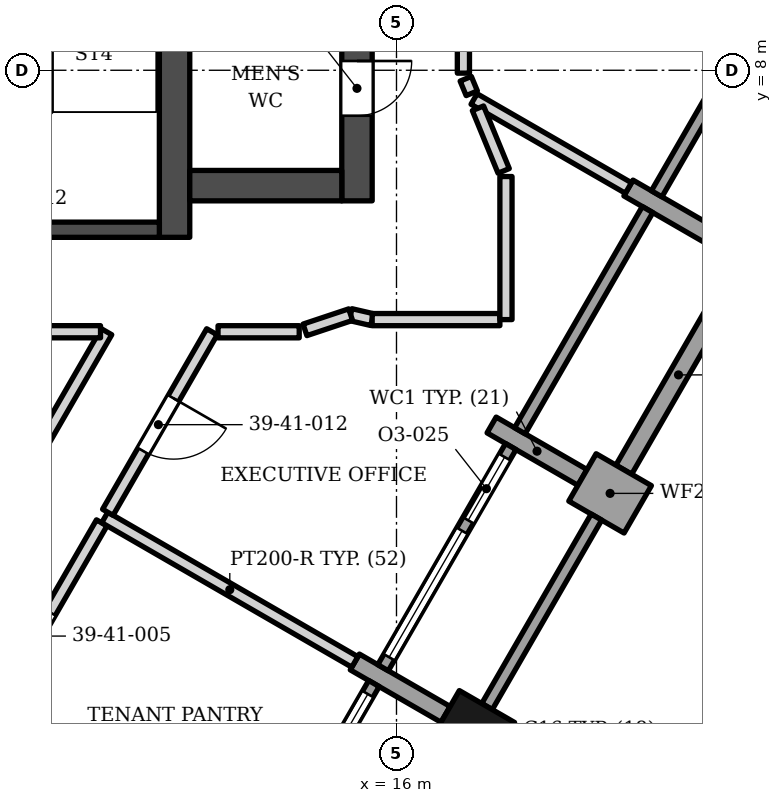
"""IFC4 building model, lengths in metres.
Left out: names, types, materials, properties, quantities, classifications, styles, units other than length and angle.
Written with IfcOpenShell. Run it as: python <this file> out.ifc"""

import sys

from ifc_helpers import new_model, si_unit, direction, frame, frame_2d, origin, origin_2d, place, context, subcontext, project, spatial, polyline, rectangle, outline, extrude, element, fill, save


model = new_model("IFC4")
c1 = context("Model", 3, precision=1e-05, world=origin(), true_north=direction((0.0, 1.0)))
c2 = subcontext(c1, "Body", "Model", "MODEL_VIEW")
j1 = project(units=[si_unit("LENGTHUNIT", "METRE"), si_unit("PLANEANGLEUNIT", "RADIAN")], contexts=[c1])
p1 = place(None, origin())
s1 = spatial("IfcSite", under=j1, at=p1, CompositionType="ELEMENT")
p2 = place(p1, origin())
s2 = spatial("IfcBuilding", under=s1, at=p2, CompositionType="ELEMENT")
p3 = place(p2, frame((0.0, 0.0, 168.0)))
s3 = spatial("IfcBuildingStorey", under=s2, at=p3, CompositionType="ELEMENT", Elevation=168.0)
p4 = place(p3, frame((12.35, 5.253, 0.0), z_axis=(0.0, 0.0, 1.0), x_axis=(0.0, 1.0, 0.0)))
e1 = element("IfcWall", 1, at=p4, inside=s3, PredefinedType="SHEAR", context=c2, shape_type="SweptSolid", body=[
    extrude(rectangle(XDim=13.3, YDim=0.5, at=frame_2d((6.65, 0.0))), origin(), (0.0, 0.0, 1.0), 3.9),
])
p5 = place(p3, frame((8.35, 5.378, 0.0), z_axis=(0.0, 0.0, 1.0), x_axis=(1.0, 0.0, 0.0)))
e2 = element("IfcWall", 2, at=p5, inside=s3, PredefinedType="SHEAR", context=c2, shape_type="SweptSolid", body=[
    extrude(rectangle(XDim=3.75, YDim=0.25, at=frame_2d((1.875, 0.0))), origin(), (0.0, 0.0, 1.0), 3.9),
])
p6 = place(p3, frame((12.6, 6.103, 0.0), z_axis=(0.0, 0.0, 1.0), x_axis=(1.0, 0.0, 0.0)))
e3 = element("IfcWall", 3, at=p6, inside=s3, PredefinedType="SHEAR", context=c2, shape_type="SweptSolid", body=[
    extrude(rectangle(XDim=2.5, YDim=0.5, at=frame_2d((1.25, 0.0))), origin(), (0.0, 0.0, 1.0), 3.9),
])
p7 = place(p3, frame((15.35, 5.853, 0.0), z_axis=(0.0, 0.0, 1.0), x_axis=(0.0, 1.0, 0.0)))
e4 = element("IfcWall", 4, at=p7, inside=s3, PredefinedType="SHEAR", context=c2, shape_type="SweptSolid", body=[
    extrude(rectangle(XDim=13.2, YDim=0.5, at=frame_2d((6.6, 0.0))), origin(), (0.0, 0.0, 1.0), 3.9),
])
p8 = place(p7, frame((4.1, 0.0, 0.0)))
e5 = element("IfcOpeningElement", 5, at=p8, cuts=e4, PredefinedType="OPENING", context=c2, shape_type="SweptSolid", body=[
    extrude(rectangle(XDim=1.6, YDim=2.1, at=frame_2d((0.8, 1.05))), frame((0.0, 0.26, 0.0), z_axis=(0.0, -1.0, 0.0), x_axis=(1.0, 0.0, 0.0)), (0.0, 0.0, 1.0), 0.52),
])
p9 = place(p7, frame((1.4, 0.0, 0.0)))
e6 = element("IfcOpeningElement", 6, at=p9, cuts=e4, PredefinedType="OPENING", context=c2, shape_type="SweptSolid", body=[
    extrude(rectangle(XDim=0.9, YDim=2.1, at=frame_2d((0.45, 1.05))), frame((0.0, 0.26, 0.0), z_axis=(0.0, -1.0, 0.0), x_axis=(1.0, 0.0, 0.0)), (0.0, 0.0, 1.0), 0.52),
])
p10 = place(p7, frame((10.15, 0.0, 0.0)))
e7 = element("IfcOpeningElement", 7, at=p10, cuts=e4, PredefinedType="OPENING", context=c2, shape_type="SweptSolid", body=[
    extrude(rectangle(XDim=0.9, YDim=2.1, at=frame_2d((0.45, 1.05))), frame((0.0, 0.26, 0.0), z_axis=(0.0, -1.0, 0.0), x_axis=(1.0, 0.0, 0.0)), (0.0, 0.0, 1.0), 0.52),
])
p11 = place(p3, frame((17.263, -2.853, 0.0), z_axis=(0.0, 0.0, 1.0), x_axis=(0.499999984885, 0.866025412511, 0.0)))
e8 = element("IfcColumn", 8, at=p11, inside=s3, PredefinedType="COLUMN", context=c2, shape_type="SweptSolid", body=[
    extrude(rectangle(XDim=0.9, YDim=1.05, at=origin_2d()), origin(), (0.0, 0.0, 1.0), 3.9),
])
p12 = place(p3, frame((16.807, -2.592, 0.0), z_axis=(0.0, 0.0, 1.0), x_axis=(-0.865994550583, 0.500053435504, 0.0)))
e9 = element("IfcWall", 9, at=p12, inside=s3, PredefinedType="SOLIDWALL", context=c2, shape_type="SweptSolid", body=[
    extrude(rectangle(XDim=1.724, YDim=0.3, at=frame_2d((0.862, 0.0))), origin(), (0.0, 0.0, 1.0), 3.0),
])
p13 = place(p3, frame((19.058, 1.304, 0.0), z_axis=(0.0, 0.0, 1.0), x_axis=(0.866030680601, -0.499990860175, 0.0)))
e10 = element("IfcWall", 10, at=p13, inside=s3, PredefinedType="SOLIDWALL", context=c2, shape_type="SweptSolid", body=[
    extrude(rectangle(XDim=1.05, YDim=0.9, at=frame_2d((0.525, 0.0))), origin(), (0.0, 0.0, 1.0), 3.0),
])
p14 = place(p3, frame((19.058, 1.304, 0.0), z_axis=(0.0, 0.0, 1.0), x_axis=(-0.866013532718, 0.500020560727, 0.0)))
e11 = element("IfcWall", 11, at=p14, inside=s3, PredefinedType="SOLIDWALL", context=c2, shape_type="SweptSolid", body=[
    extrude(rectangle(XDim=1.725, YDim=0.3, at=frame_2d((0.863, 0.0))), origin(), (0.0, 0.0, 1.0), 3.0),
])
p15 = place(p3, frame((19.814, 6.064, 0.0), z_axis=(0.0, 0.0, 1.0), x_axis=(0.866013532718, -0.500020560727, 0.0)))
e12 = element("IfcWall", 12, at=p15, inside=s3, PredefinedType="SOLIDWALL", context=c2, shape_type="SweptSolid", body=[
    extrude(rectangle(XDim=1.725, YDim=0.3, at=frame_2d((0.863, 0.0))), origin(), (0.0, 0.0, 1.0), 2.95),
])
p16 = place(p3, frame((13.529, -5.722, 0.0), z_axis=(0.0, 0.0, 1.0), x_axis=(0.500027713859, 0.866009402589, 0.0)))
e13 = element("IfcWall", 13, at=p16, inside=s3, PredefinedType="ELEMENTEDWALL", context=c2, shape_type="SweptSolid", body=[
    extrude(rectangle(XDim=4.2, YDim=0.2, at=frame_2d((2.1, 0.0))), origin(), (0.0, 0.0, 1.0), 3.0),
])
p17 = place(p16, frame((0.2, 0.0, 0.45)))
e14 = element("IfcOpeningElement", 14, at=p17, cuts=e13, PredefinedType="OPENING", context=c2, shape_type="SweptSolid", body=[
    extrude(rectangle(XDim=3.8, YDim=2.25, at=frame_2d((1.9, 1.125))), frame((0.0, 0.11, 0.0), z_axis=(0.0, -1.0, 0.0), x_axis=(1.0, 0.0, 0.0)), (0.0, 0.0, 1.0), 0.22),
])
p18 = place(p3, origin())
e15 = element("IfcWall", 15, at=p18, inside=s3, PredefinedType="SOLIDWALL", context=c2, shape_type="SweptSolid", body=[
    extrude(outline(polyline([(19.201, 0.702), (17.402, -2.414), (17.576, -2.514), (19.375, 0.602), (19.201, 0.702)])), origin(), (0.0, 0.0, 1.0), 3.0),
])
p19 = place(p3, frame((15.779, -1.825, 0.0), z_axis=(0.0, 0.0, 1.0), x_axis=(0.500002543286, 0.866023935413, 0.0)))
e16 = element("IfcWall", 16, at=p19, inside=s3, PredefinedType="ELEMENTEDWALL", context=c2, shape_type="SweptSolid", body=[
    extrude(rectangle(XDim=4.2, YDim=0.2, at=frame_2d((2.1, 0.0))), origin(), (0.0, 0.0, 1.0), 3.0),
])
p20 = place(p19, frame((0.2, 0.0, 0.45)))
e17 = element("IfcOpeningElement", 17, at=p20, cuts=e16, PredefinedType="OPENING", context=c2, shape_type="SweptSolid", body=[
    extrude(rectangle(XDim=2.4, YDim=2.25, at=frame_2d((1.2, 1.125))), frame((0.0, 0.11, 0.0), z_axis=(0.0, -1.0, 0.0), x_axis=(1.0, 0.0, 0.0)), (0.0, 0.0, 1.0), 0.22),
])
p21 = place(p19, frame((2.8, 0.0, 0.0)))
e18 = element("IfcOpeningElement", 18, at=p21, cuts=e16, PredefinedType="OPENING", context=c2, shape_type="SweptSolid", body=[
    extrude(rectangle(XDim=1.2, YDim=2.7, at=frame_2d((0.6, 1.35))), frame((0.0, 0.11, 0.0), z_axis=(0.0, -1.0, 0.0), x_axis=(1.0, 0.0, 0.0)), (0.0, 0.0, 1.0), 0.22),
])
p22 = place(p3, frame((19.738, 1.431, 0.0), z_axis=(0.0, 0.0, 1.0), x_axis=(0.499982693035, 0.866035395735, 0.0)))
e19 = element("IfcWall", 19, at=p22, inside=s3, PredefinedType="SOLIDWALL", context=c2, shape_type="SweptSolid", body=[
    extrude(rectangle(XDim=3.6, YDim=0.3, at=frame_2d((1.8, 0.0))), origin(), (0.0, 0.0, 1.0), 3.0),
])
p23 = place(p3, frame((18.029, 2.072, 0.0), z_axis=(0.0, 0.0, 1.0), x_axis=(0.500027713859, 0.866009402589, 0.0)))
e20 = element("IfcWall", 20, at=p23, inside=s3, PredefinedType="ELEMENTEDWALL", context=c2, shape_type="SweptSolid", body=[
    extrude(rectangle(XDim=4.2, YDim=0.2, at=frame_2d((2.1, 0.0))), origin(), (0.0, 0.0, 1.0), 2.95),
])
p24 = place(p3, frame((20.279, 5.969, 0.0), z_axis=(0.0, 0.0, 1.0), x_axis=(0.500002543286, 0.866023935413, 0.0)))
e21 = element("IfcWall", 21, at=p24, inside=s3, PredefinedType="ELEMENTEDWALL", context=c2, shape_type="SweptSolid", body=[
    extrude(rectangle(XDim=4.2, YDim=0.2, at=frame_2d((2.1, 0.0))), origin(), (0.0, 0.0, 1.0), 3.0),
])
p25 = place(p3, frame((5.233, -6.688, 0.0), z_axis=(0.0, 0.0, 1.0), x_axis=(0.499991401208, 0.866030368243, 0.0)))
e22 = element("IfcWall", 22, at=p25, inside=s3, PredefinedType="PARTITIONING", context=c2, shape_type="SweptSolid", body=[
    extrude(rectangle(XDim=11.996, YDim=0.2, at=frame_2d((5.998, 0.0))), origin(), (0.0, 0.0, 1.0), 3.052),
])
p26 = place(p3, frame((8.954, -3.252, 0.0), z_axis=(0.0, 0.0, 1.0), x_axis=(0.499989943423, 0.866031209874, 0.0)))
e23 = element("IfcWall", 23, at=p26, inside=s3, PredefinedType="PARTITIONING", context=c2, shape_type="SweptSolid", body=[
    extrude(rectangle(XDim=4.398, YDim=0.2, at=frame_2d((2.199, 0.0))), origin(), (0.0, 0.0, 1.0), 3.052),
])
p27 = place(p26, frame((1.798, 0.0, 0.0)))
e24 = element("IfcOpeningElement", 24, at=p27, cuts=e23, PredefinedType="OPENING", context=c2, shape_type="SweptSolid", body=[
    extrude(rectangle(XDim=0.9, YDim=2.1, at=frame_2d((0.45, 1.05))), frame((0.0, 0.11, 0.0), z_axis=(0.0, -1.0, 0.0), x_axis=(1.0, 0.0, 0.0)), (0.0, 0.0, 1.0), 0.22),
])
p28 = place(p3, frame((11.202, 0.646, 0.0), z_axis=(0.0, 0.0, 1.0), x_axis=(0.865857651242, -0.500290443428, 0.0)))
e25 = element("IfcWall", 25, at=p28, inside=s3, PredefinedType="PARTITIONING", context=c2, shape_type="SweptSolid", body=[
    extrude(rectangle(XDim=4.75, YDim=0.2, at=frame_2d((2.375, 0.0))), origin(), (0.0, 0.0, 1.0), 3.052),
])
p29 = place(p3, frame((5.994, 3.7, 0.0), z_axis=(0.0, 0.0, 1.0), x_axis=(0.999999998871, -4.7510452e-05, 0.0)))
e26 = element("IfcWall", 26, at=p29, inside=s3, PredefinedType="PARTITIONING", context=c2, shape_type="SweptSolid", body=[
    extrude(rectangle(XDim=5.139, YDim=0.2, at=frame_2d((2.569, 0.0))), origin(), (0.0, 0.0, 1.0), 3.73),
])
p30 = place(p29, frame((1.222, 0.0, 0.0)))
e27 = element("IfcOpeningElement", 27, at=p30, cuts=e26, PredefinedType="OPENING", context=c2, shape_type="SweptSolid", body=[
    extrude(rectangle(XDim=1.0, YDim=2.1, at=frame_2d((0.5, 1.05))), frame((0.0, 0.11, 0.0), z_axis=(0.0, -1.0, 0.0), x_axis=(1.0, 0.0, 0.0)), (0.0, 0.0, 1.0), 0.22),
])
p31 = place(p3, frame((11.253, 0.731, 0.0), z_axis=(0.0, 0.0, 1.0), x_axis=(0.499648448578, 0.866228276976, 0.0)))
e28 = element("IfcWall", 28, at=p31, inside=s3, PredefinedType="PARTITIONING", context=c2, shape_type="SweptSolid", body=[
    extrude(rectangle(XDim=3.427, YDim=0.2, at=frame_2d((1.714, 0.0))), origin(), (0.0, 0.0, 1.0), 3.73),
])
p32 = place(p31, frame((1.164, 0.0, 0.0)))
e29 = element("IfcOpeningElement", 29, at=p32, cuts=e28, PredefinedType="OPENING", context=c2, shape_type="SweptSolid", body=[
    extrude(rectangle(XDim=1.0, YDim=2.4, at=frame_2d((0.5, 1.2))), frame((0.0, 0.11, 0.0), z_axis=(0.0, -1.0, 0.0), x_axis=(1.0, 0.0, 0.0)), (0.0, 0.0, 1.0), 0.22),
])
p33 = place(p3, frame((13.065, 3.699, 0.0), z_axis=(0.0, 0.0, 1.0), x_axis=(1.0, 0.0, 0.0)))
e30 = element("IfcWall", 30, at=p33, inside=s3, PredefinedType="PARTITIONING", context=c2, shape_type="SweptSolid", body=[
    extrude(rectangle(XDim=1.335, YDim=0.2, at=frame_2d((0.667, 0.0))), origin(), (0.0, 0.0, 1.0), 3.052),
])
p34 = place(p3, frame((15.246, 3.981, 0.0), z_axis=(0.0, 0.0, 1.0), x_axis=(0.974255315496, -0.225447511024, 0.0)))
e31 = element("IfcWall", 31, at=p34, inside=s3, PredefinedType="PARTITIONING", context=c2, shape_type="SweptSolid", body=[
    extrude(rectangle(XDim=0.364, YDim=0.2, at=frame_2d((0.182, 0.0))), origin(), (0.0, 0.0, 1.0), 3.73),
])
p35 = place(p3, frame((15.6, 3.899, 0.0), z_axis=(0.0, 0.0, 1.0), x_axis=(0.999999993243, 0.000116252034, 0.0)))
e32 = element("IfcWall", 32, at=p35, inside=s3, PredefinedType="PARTITIONING", context=c2, shape_type="SweptSolid", body=[
    extrude(rectangle(XDim=2.1, YDim=0.2, at=frame_2d((1.05, 0.0))), origin(), (0.0, 0.0, 1.0), 3.73),
])
p36 = place(p3, frame((14.495, 3.731, 0.0), z_axis=(0.0, 0.0, 1.0), x_axis=(0.948683298051, 0.316227766017, 0.0)))
e33 = element("IfcWall", 33, at=p36, inside=s3, PredefinedType="PARTITIONING", context=c2, shape_type="SweptSolid", body=[
    extrude(rectangle(XDim=0.791, YDim=0.2, at=frame_2d((0.396, 0.0))), origin(), (0.0, 0.0, 1.0), 3.73),
])
p37 = place(p3, frame((17.276, 7.527, 0.0), z_axis=(0.0, 0.0, 1.0), x_axis=(0.866324259283, -0.499482009464, 0.0)))
e34 = element("IfcWall", 34, at=p37, inside=s3, PredefinedType="PARTITIONING", context=c2, shape_type="SweptSolid", body=[
    extrude(rectangle(XDim=2.93, YDim=0.2, at=frame_2d((1.465, 0.0))), origin(), (0.0, 0.0, 1.0), 3.73),
])
p38 = place(p3, frame((17.8, 3.9, 0.0), z_axis=(0.0, 0.0, 1.0), x_axis=(0.000103755965, 0.999999994617, 0.0)))
e35 = element("IfcWall", 35, at=p38, inside=s3, PredefinedType="PARTITIONING", context=c2, shape_type="SweptSolid", body=[
    extrude(rectangle(XDim=2.353, YDim=0.2, at=frame_2d((1.177, 0.0))), origin(), (0.0, 0.0, 1.0), 2.95),
])
p39 = place(p3, frame((17.34, 7.375, 0.0), z_axis=(0.0, 0.0, 1.0), x_axis=(0.379657440063, -0.925127141643, 0.0)))
e36 = element("IfcWall", 36, at=p39, inside=s3, PredefinedType="PARTITIONING", context=c2, shape_type="SweptSolid", body=[
    extrude(rectangle(XDim=1.113, YDim=0.2, at=frame_2d((0.557, 0.0))), origin(), (0.0, 0.0, 1.0), 3.73),
])
p40 = place(p3, frame((17.139, 7.86, 0.0), z_axis=(0.0, 0.0, 1.0), x_axis=(0.383408069738, -0.923579044836, 0.0)))
e37 = element("IfcWall", 37, at=p40, inside=s3, PredefinedType="PARTITIONING", context=c2, shape_type="SweptSolid", body=[
    extrude(rectangle(XDim=0.259, YDim=0.2, at=frame_2d((0.129, 0.0))), origin(), (0.0, 0.0, 1.0), 3.73),
])
p41 = place(p3, frame((17.101, 7.953, 0.0), z_axis=(0.0, 0.0, 1.0), x_axis=(0.0, 1.0, 0.0)))
e38 = element("IfcWall", 38, at=p41, inside=s3, PredefinedType="PARTITIONING", context=c2, shape_type="SweptSolid", body=[
    extrude(rectangle(XDim=5.5, YDim=0.2, at=frame_2d((2.75, 0.0))), origin(), (0.0, 0.0, 1.0), 3.73),
])
p42 = place(p41, frame((1.85, 0.0, 0.0)))
e39 = element("IfcOpeningElement", 39, at=p42, cuts=e38, PredefinedType="OPENING", context=c2, shape_type="SweptSolid", body=[
    extrude(rectangle(XDim=1.8, YDim=2.4, at=frame_2d((0.9, 1.2))), frame((0.0, 0.11, 0.0), z_axis=(0.0, -1.0, 0.0), x_axis=(1.0, 0.0, 0.0)), (0.0, 0.0, 1.0), 0.22),
])
p43 = place(p17, origin())
e40 = element("IfcWindow", 40, at=p43, inside=s3, PartitioningType="SINGLE_PANEL", PredefinedType="WINDOW", context=c2, shape_type="SweptSolid", body=[
    extrude(rectangle(XDim=3.8, YDim=2.25, at=frame_2d((1.9, 1.125))), frame((0.0, 0.03, 0.0), z_axis=(0.0, -1.0, 0.0), x_axis=(1.0, 0.0, 0.0)), (0.0, 0.0, 1.0), 0.06),
])
fill(e14, e40)
p44 = place(p20, origin())
e41 = element("IfcWindow", 41, at=p44, inside=s3, PartitioningType="SINGLE_PANEL", PredefinedType="WINDOW", context=c2, shape_type="SweptSolid", body=[
    extrude(rectangle(XDim=2.4, YDim=2.25, at=frame_2d((1.2, 1.125))), frame((0.0, 0.03, 0.0), z_axis=(0.0, -1.0, 0.0), x_axis=(1.0, 0.0, 0.0)), (0.0, 0.0, 1.0), 0.06),
])
fill(e17, e41)
p45 = place(p21, origin())
e42 = element("IfcDoor", 42, at=p45, inside=s3, OperationType="SINGLE_SWING_LEFT", PredefinedType="DOOR", context=c2, shape_type="SweptSolid", body=[
    extrude(rectangle(XDim=1.2, YDim=2.7, at=frame_2d((0.6, 1.35))), frame((0.0, 0.025, 0.0), z_axis=(0.0, -1.0, 0.0), x_axis=(1.0, 0.0, 0.0)), (0.0, 0.0, 1.0), 0.05),
])
fill(e18, e42)
p46 = place(p9, origin())
e43 = element("IfcDoor", 43, at=p46, inside=s3, OperationType="SINGLE_SWING_RIGHT", PredefinedType="DOOR", context=c2, shape_type="SweptSolid", body=[
    extrude(rectangle(XDim=0.9, YDim=2.1, at=frame_2d((0.45, 1.05))), frame((0.0, 0.025, 0.0), z_axis=(0.0, -1.0, 0.0), x_axis=(1.0, 0.0, 0.0)), (0.0, 0.0, 1.0), 0.05),
])
fill(e6, e43)
p47 = place(p32, origin())
e44 = element("IfcDoor", 44, at=p47, inside=s3, OperationType="SINGLE_SWING_RIGHT", PredefinedType="DOOR", context=c2, shape_type="SweptSolid", body=[
    extrude(rectangle(XDim=1.0, YDim=2.4, at=frame_2d((0.5, 1.2))), frame((0.0, 0.025, 0.0), z_axis=(0.0, -1.0, 0.0), x_axis=(1.0, 0.0, 0.0)), (0.0, 0.0, 1.0), 0.05),
])
fill(e29, e44)
save(model, sys.argv[1])
